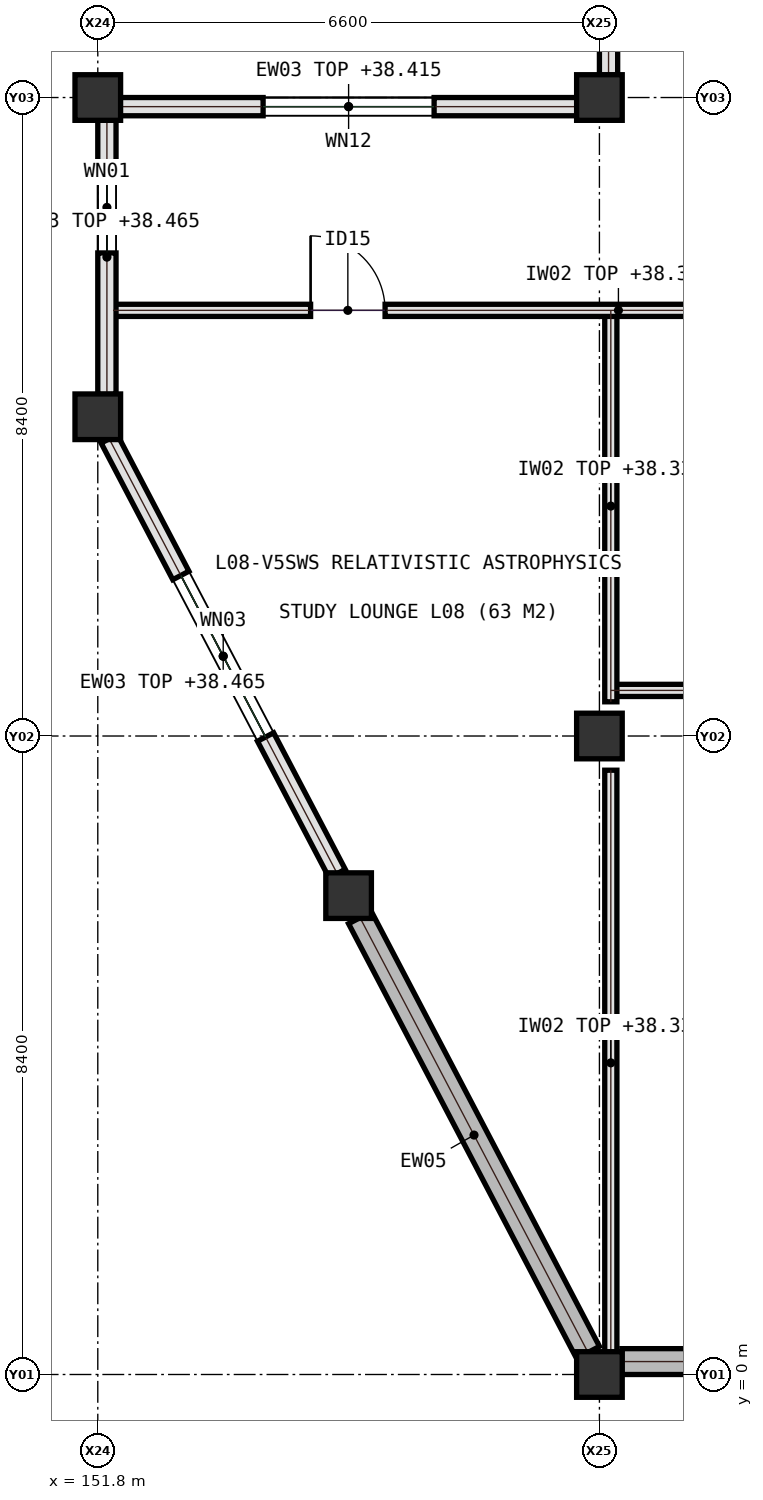
"""IFC4 building model, lengths in metres.
Left out: names, types, materials, properties, quantities, classifications, styles, units other than length and angle.
Written with IfcOpenShell. Run it as: python <this file> out.ifc"""

import sys

from ifc_helpers import new_model, si_unit, direction, frame, frame_2d, origin, origin_2d, place, context, subcontext, project, spatial, rectangle, extrude, element, fill, save


model = new_model("IFC4")
c1 = context("Model", 3, precision=1e-05, world=origin(), true_north=direction((0.0, 1.0)))
c2 = subcontext(c1, "Body", "Model", "MODEL_VIEW")
j1 = project(units=[si_unit("LENGTHUNIT", "METRE"), si_unit("PLANEANGLEUNIT", "RADIAN")], contexts=[c1])
p1 = place(None, origin())
s1 = spatial("IfcSite", under=j1, at=p1, CompositionType="ELEMENT")
p2 = place(p1, origin())
s2 = spatial("IfcBuilding", under=s1, at=p2, CompositionType="ELEMENT")
p3 = place(p2, frame((0.0, 0.0, 35.4)))
s3 = spatial("IfcBuildingStorey", under=s2, at=p3, CompositionType="ELEMENT", Elevation=35.4)
for number, where, z_axis, x_axis in (
    (1, (151.8, 16.8, 0.0), (0.0, 0.0, 1.0), (1.0, 0.0, 0.0)),
    (2, (158.4, 0.0, 0.0), (0.0, 0.0, 1.0), (1.0, 0.0, 0.0)),
    (3, (158.4, 8.4, 0.0), (0.0, 0.0, 1.0), (1.0, 0.0, 0.0)),
    (4, (158.4, 16.8, 0.0), (0.0, 0.0, 1.0), (1.0, 0.0, 0.0)),
    (5, (151.8, 12.6, 0.0), (0.0, 0.0, 1.0), (1.0, 0.0, 0.0)),
    (6, (155.1, 6.3, 0.0), (0.0, 0.0, 1.0), (1.0, 0.0, 0.0)),
):
    element("IfcColumn", number, at=place(p3, frame(where, z_axis=z_axis, x_axis=x_axis)), inside=s3, PredefinedType="COLUMN", context=c2, shape_type="SweptSolid", body=[
        extrude(rectangle(XDim=0.6, YDim=0.6, at=origin_2d()), origin(), (0.0, 0.0, 1.0), 3.9),
    ])
p4 = place(p3, frame((158.55, 9.0, 0.0), z_axis=(0.0, 0.0, 1.0), x_axis=(1.0, 0.0, 0.0)))
e7 = element("IfcWall", 7, at=p4, inside=s3, PredefinedType="PARTITIONING", context=c2, shape_type="SweptSolid", body=[
    extrude(rectangle(XDim=6.75, YDim=0.16, at=frame_2d((3.375, 0.0))), origin(), (0.0, 0.0, 1.0), 2.93),
])
p5 = place(p4, frame((2.5, 0.0, 0.0)))
e8 = element("IfcOpeningElement", 8, at=p5, cuts=e7, PredefinedType="OPENING", context=c2, shape_type="SweptSolid", body=[
    extrude(rectangle(XDim=1.05, YDim=2.15, at=frame_2d((0.525, 1.075))), frame((0.0, 0.09, 0.0), z_axis=(0.0, -1.0, 0.0), x_axis=(1.0, 0.0, 0.0)), (0.0, 0.0, 1.0), 0.18),
])
p6 = place(p3, frame((158.55, 0.25, 0.0), z_axis=(0.0, 0.0, 1.0), x_axis=(0.0, 1.0, 0.0)))
e9 = element("IfcWall", 9, at=p6, inside=s3, PredefinedType="PARTITIONING", context=c2, shape_type="SweptSolid", body=[
    extrude(rectangle(XDim=7.7, YDim=0.16, at=frame_2d((3.85, 0.0))), origin(), (0.0, 0.0, 1.0), 2.93),
])
p7 = place(p3, frame((158.55, 8.85, 0.0), z_axis=(0.0, 0.0, 1.0), x_axis=(0.0, 1.0, 0.0)))
e10 = element("IfcWall", 10, at=p7, inside=s3, PredefinedType="PARTITIONING", context=c2, shape_type="SweptSolid", body=[
    extrude(rectangle(XDim=5.15, YDim=0.16, at=frame_2d((2.575, 0.0))), origin(), (0.0, 0.0, 1.0), 2.93),
])
p8 = place(p3, frame((152.0, 14.0, 0.0), z_axis=(0.0, 0.0, 1.0), x_axis=(1.0, 0.0, 0.0)))
e11 = element("IfcWall", 11, at=p8, inside=s3, PredefinedType="PARTITIONING", context=c2, shape_type="SweptSolid", body=[
    extrude(rectangle(XDim=13.3, YDim=0.16, at=frame_2d((6.65, 0.0))), origin(), (0.0, 0.0, 1.0), 2.93),
])
p9 = place(p8, frame((2.6, 0.0, 0.0)))
e12 = element("IfcOpeningElement", 12, at=p9, cuts=e11, PredefinedType="OPENING", context=c2, shape_type="SweptSolid", body=[
    extrude(rectangle(XDim=0.98, YDim=2.12, at=frame_2d((0.49, 1.06))), frame((0.0, 0.09, 0.0), z_axis=(0.0, -1.0, 0.0), x_axis=(1.0, 0.0, 0.0)), (0.0, 0.0, 1.0), 0.18),
])
p10 = place(p8, frame((9.8, 0.0, 0.0)))
e13 = element("IfcOpeningElement", 13, at=p10, cuts=e11, PredefinedType="OPENING", context=c2, shape_type="SweptSolid", body=[
    extrude(rectangle(XDim=0.98, YDim=2.12, at=frame_2d((0.49, 1.06))), frame((0.0, 0.09, 0.0), z_axis=(0.0, -1.0, 0.0), x_axis=(1.0, 0.0, 0.0)), (0.0, 0.0, 1.0), 0.18),
])
p11 = place(p3, frame((158.105, 16.68, 0.0), z_axis=(0.0, 0.0, 1.0), x_axis=(-1.0, 0.0, 0.0)))
e14 = element("IfcWall", 14, at=p11, inside=s3, PredefinedType="SOLIDWALL", context=c2, shape_type="SweptSolid", body=[
    extrude(rectangle(XDim=6.01, YDim=0.24, at=frame_2d((3.005, 0.0))), origin(), (0.0, 0.0, 1.0), 3.015),
])
p12 = place(p11, frame((1.88, 0.0, 0.95)))
e15 = element("IfcOpeningElement", 15, at=p12, cuts=e14, PredefinedType="OPENING", context=c2, shape_type="SweptSolid", body=[
    extrude(rectangle(XDim=2.25, YDim=1.55, at=frame_2d((1.125, 0.775))), frame((0.0, 0.13, 0.0), z_axis=(0.0, -1.0, 0.0), x_axis=(1.0, 0.0, 0.0)), (0.0, 0.0, 1.0), 0.26),
])
p13 = place(p3, frame((158.695, 0.17, 0.0), z_axis=(0.0, 0.0, 1.0), x_axis=(1.0, 0.0, 0.0)))
e16 = element("IfcWall", 16, at=p13, inside=s3, PredefinedType="SHEAR", context=c2, shape_type="SweptSolid", body=[
    extrude(rectangle(XDim=6.01, YDim=0.34, at=frame_2d((3.005, 0.0))), origin(), (0.0, 0.0, 1.0), 3.68),
])
p14 = place(p3, frame((158.52, 24.905, 0.0), z_axis=(0.0, 0.0, 1.0), x_axis=(0.0, -1.0, 0.0)))
e17 = element("IfcWall", 17, at=p14, inside=s3, PredefinedType="SOLIDWALL", context=c2, shape_type="SweptSolid", body=[
    extrude(rectangle(XDim=7.81, YDim=0.24, at=frame_2d((3.905, 0.0))), origin(), (0.0, 0.0, 1.0), 3.065),
])
p15 = place(p14, frame((3.005, 0.0, 0.95)))
e18 = element("IfcOpeningElement", 18, at=p15, cuts=e17, PredefinedType="OPENING", context=c2, shape_type="SweptSolid", body=[
    extrude(rectangle(XDim=1.8, YDim=1.6, at=frame_2d((0.9, 0.8))), frame((0.0, 0.13, 0.0), z_axis=(0.0, -1.0, 0.0), x_axis=(1.0, 0.0, 0.0)), (0.0, 0.0, 1.0), 0.26),
])
p16 = place(p3, frame((151.92, 16.505, 0.0), z_axis=(0.0, 0.0, 1.0), x_axis=(0.0, -1.0, 0.0)))
e19 = element("IfcWall", 19, at=p16, inside=s3, PredefinedType="SOLIDWALL", context=c2, shape_type="SweptSolid", body=[
    extrude(rectangle(XDim=3.61, YDim=0.24, at=frame_2d((1.805, 0.0))), origin(), (0.0, 0.0, 1.0), 3.065),
])
p17 = place(p16, frame((0.55, 0.0, 0.95)))
e20 = element("IfcOpeningElement", 20, at=p17, cuts=e19, PredefinedType="OPENING", context=c2, shape_type="SweptSolid", body=[
    extrude(rectangle(XDim=1.2, YDim=1.5, at=frame_2d((0.6, 0.75))), frame((0.0, 0.13, 0.0), z_axis=(0.0, -1.0, 0.0), x_axis=(1.0, 0.0, 0.0)), (0.0, 0.0, 1.0), 0.26),
])
p18 = place(p3, frame((151.95, 12.31, 0.0), z_axis=(0.0, 0.0, 1.0), x_axis=(0.464471613901, -0.885588007981, 0.0)))
e21 = element("IfcWall", 21, at=p18, inside=s3, PredefinedType="SOLIDWALL", context=c2, shape_type="SweptSolid", body=[
    extrude(rectangle(XDim=6.459, YDim=0.24, at=frame_2d((3.229, 0.0))), origin(), (0.0, 0.0, 1.0), 3.065),
])
p19 = place(p18, frame((2.03, 0.0, 0.95)))
e22 = element("IfcOpeningElement", 22, at=p19, cuts=e21, PredefinedType="OPENING", context=c2, shape_type="SweptSolid", body=[
    extrude(rectangle(XDim=2.4, YDim=1.6, at=frame_2d((1.2, 0.8))), frame((0.0, 0.13, 0.0), z_axis=(0.0, -1.0, 0.0), x_axis=(1.0, 0.0, 0.0)), (0.0, 0.0, 1.0), 0.26),
])
p20 = place(p3, frame((155.25, 6.01, 0.0), z_axis=(0.0, 0.0, 1.0), x_axis=(0.464471613901, -0.885588007981, 0.0)))
e23 = element("IfcWall", 23, at=p20, inside=s3, PredefinedType="SHEAR", context=c2, shape_type="SweptSolid", body=[
    extrude(rectangle(XDim=6.459, YDim=0.34, at=frame_2d((3.229, 0.0))), origin(), (0.0, 0.0, 1.0), 3.68),
])
p21 = place(p9, origin())
e24 = element("IfcDoor", 24, at=p21, inside=s3, OperationType="SINGLE_SWING_LEFT", PredefinedType="DOOR", context=c2, shape_type="SweptSolid", body=[
    extrude(rectangle(XDim=0.98, YDim=2.12, at=frame_2d((0.49, 1.06))), frame((0.0, 0.025, 0.0), z_axis=(0.0, -1.0, 0.0), x_axis=(1.0, 0.0, 0.0)), (0.0, 0.0, 1.0), 0.05),
])
fill(e12, e24)
p22 = place(p12, origin())
e25 = element("IfcWindow", 25, at=p22, inside=s3, PartitioningType="SINGLE_PANEL", PredefinedType="WINDOW", context=c2, shape_type="SweptSolid", body=[
    extrude(rectangle(XDim=2.25, YDim=1.55, at=frame_2d((1.125, 0.775))), frame((0.0, 0.03, 0.0), z_axis=(0.0, -1.0, 0.0), x_axis=(1.0, 0.0, 0.0)), (0.0, 0.0, 1.0), 0.06),
])
fill(e15, e25)
p23 = place(p17, origin())
e26 = element("IfcWindow", 26, at=p23, inside=s3, PartitioningType="SINGLE_PANEL", PredefinedType="WINDOW", context=c2, shape_type="SweptSolid", body=[
    extrude(rectangle(XDim=1.2, YDim=1.5, at=frame_2d((0.6, 0.75))), frame((0.0, 0.03, 0.0), z_axis=(0.0, -1.0, 0.0), x_axis=(1.0, 0.0, 0.0)), (0.0, 0.0, 1.0), 0.06),
])
fill(e20, e26)
p24 = place(p19, origin())
e27 = element("IfcWindow", 27, at=p24, inside=s3, PartitioningType="SINGLE_PANEL", PredefinedType="WINDOW", context=c2, shape_type="SweptSolid", body=[
    extrude(rectangle(XDim=2.4, YDim=1.6, at=frame_2d((1.2, 0.8))), frame((0.0, 0.03, 0.0), z_axis=(0.0, -1.0, 0.0), x_axis=(1.0, 0.0, 0.0)), (0.0, 0.0, 1.0), 0.06),
])
fill(e22, e27)
save(model, sys.argv[1])
